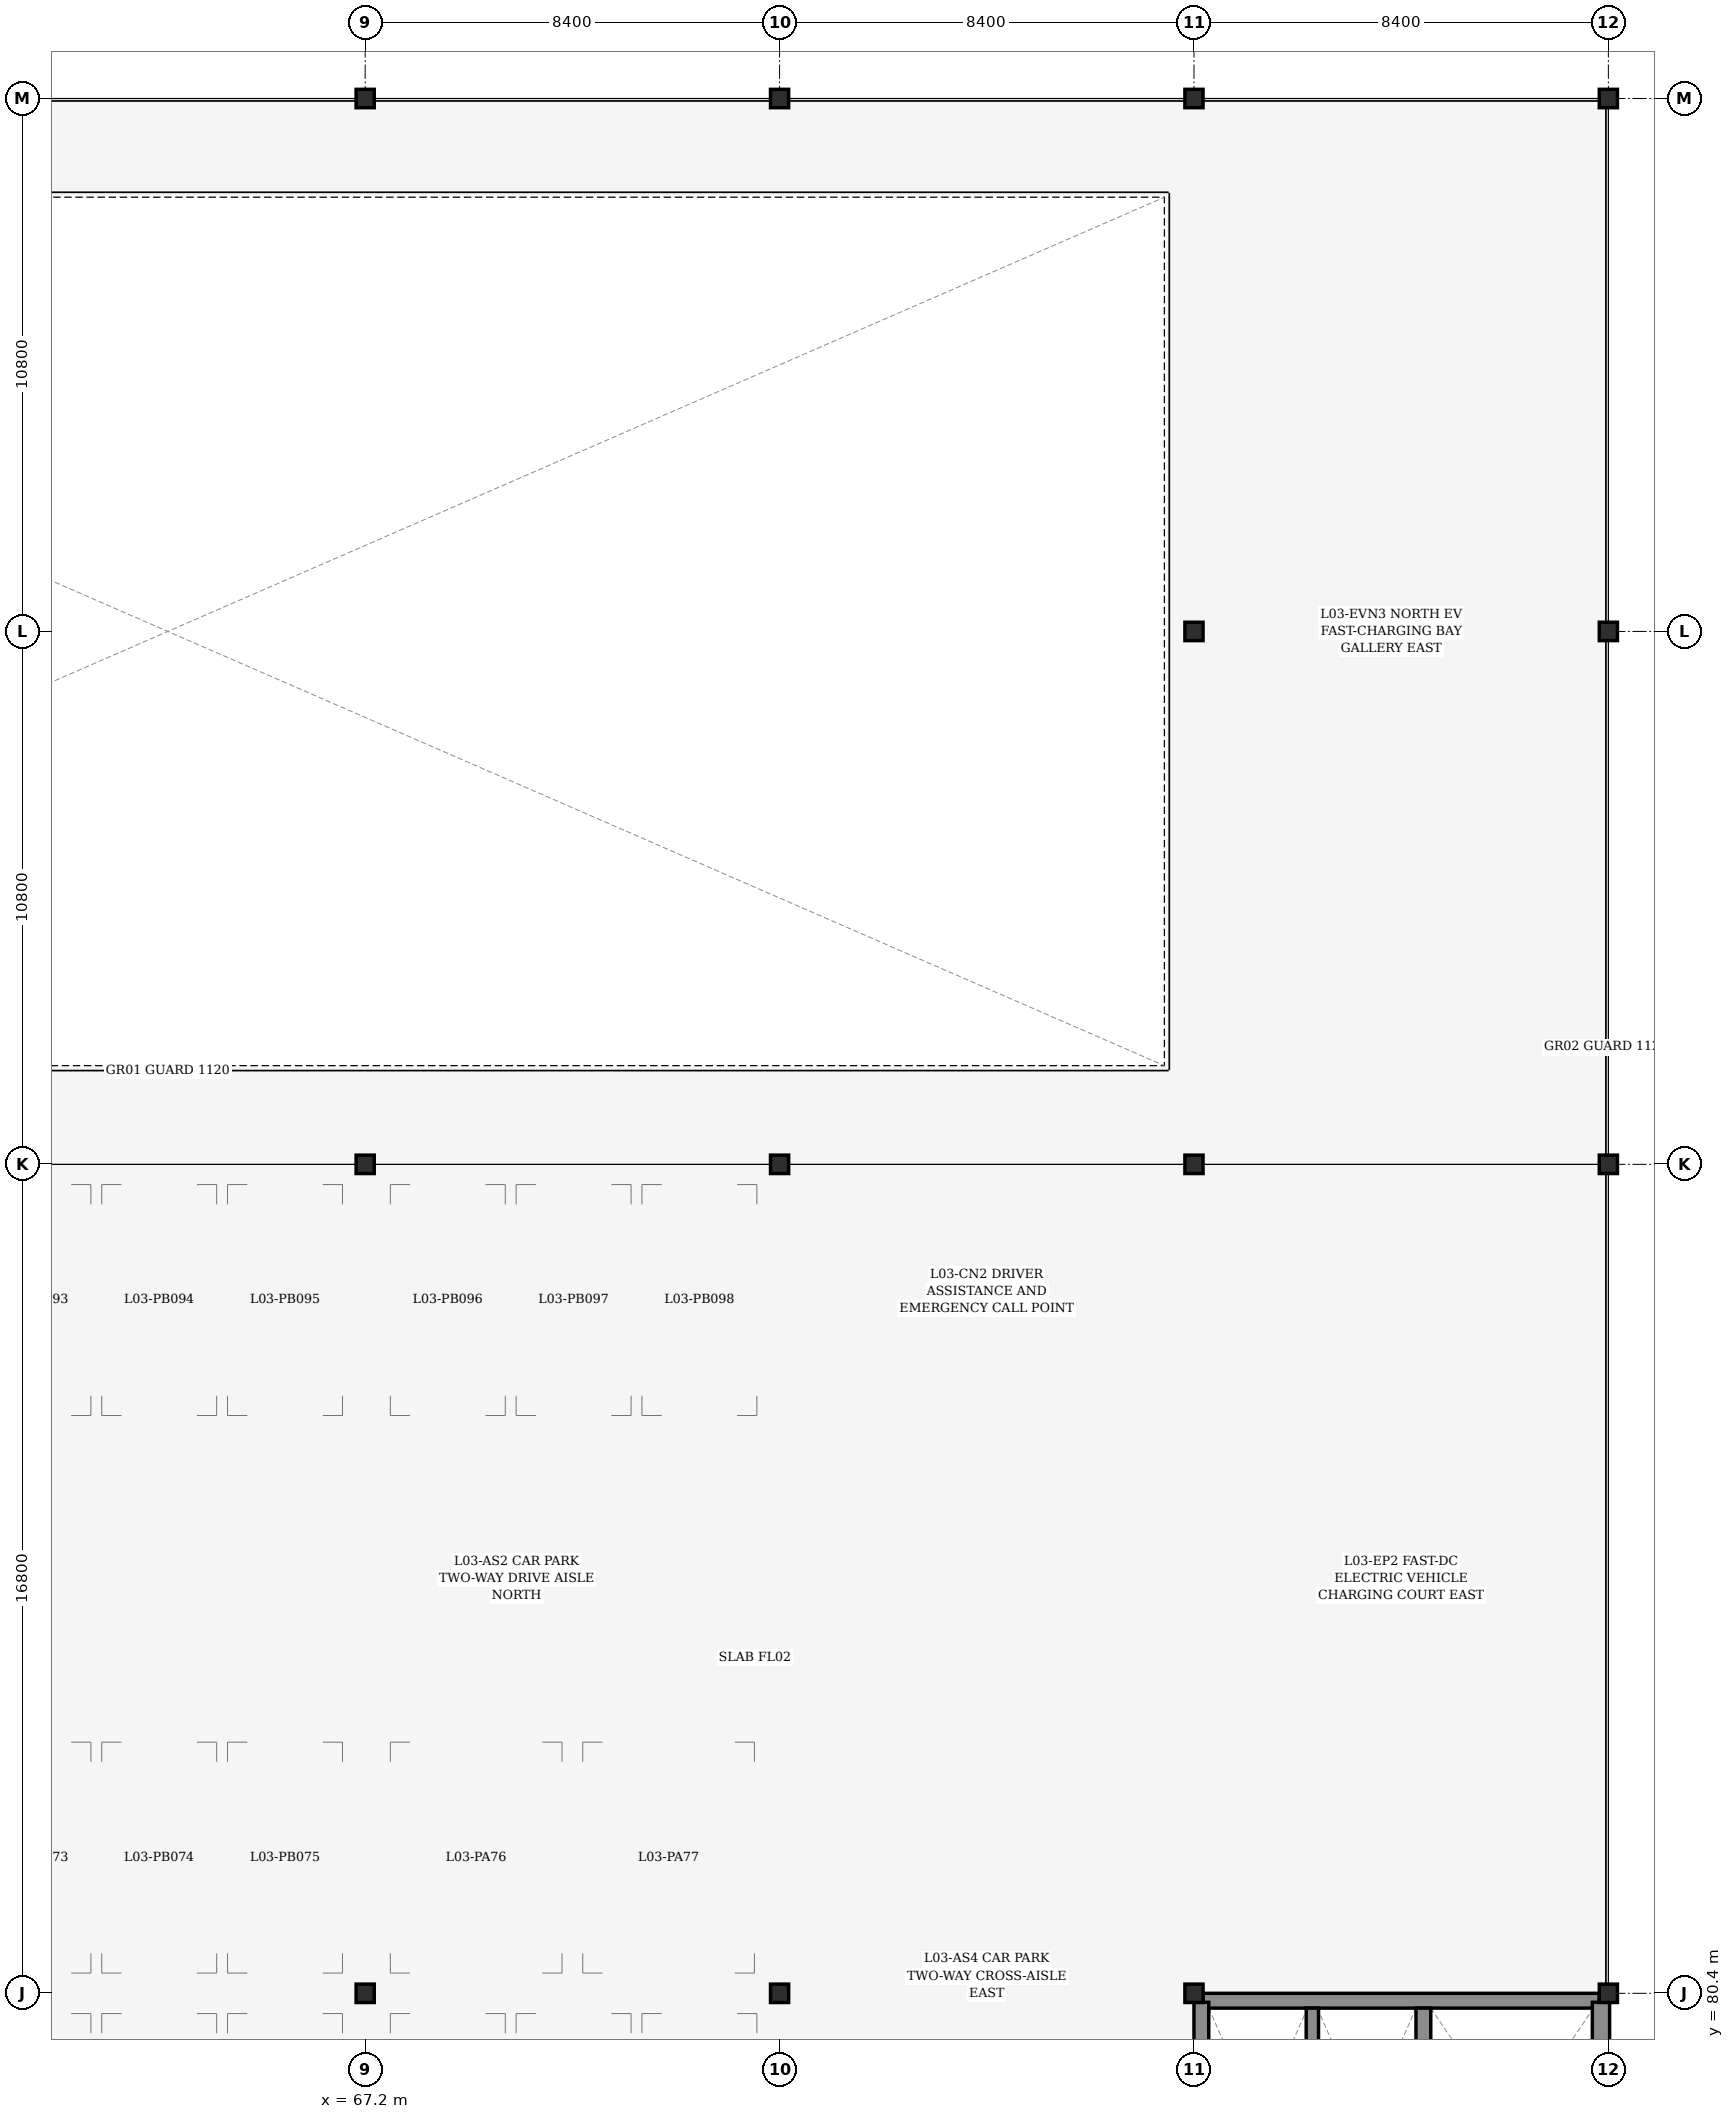
"""IFC4 building model, lengths in metres.
Left out: names, types, materials, properties, quantities, classifications, styles, units other than length and angle.
Written with IfcOpenShell. Run it as: python <this file> out.ifc"""

import sys

from ifc_helpers import new_model, si_unit, direction, frame, frame_2d, origin, origin_2d, place, context, subcontext, project, spatial, rectangle, i_section, extrude, element, save


model = new_model("IFC4")
c1 = context("Model", 3, precision=1e-05, world=origin(), true_north=direction((0.0, 1.0)))
c2 = subcontext(c1, "Body", "Model", "MODEL_VIEW")
j1 = project(units=[si_unit("LENGTHUNIT", "METRE"), si_unit("PLANEANGLEUNIT", "RADIAN")], contexts=[c1])
p1 = place(None, origin())
s1 = spatial("IfcSite", under=j1, at=p1, CompositionType="ELEMENT")
p2 = place(p1, origin())
s2 = spatial("IfcBuilding", under=s1, at=p2, CompositionType="ELEMENT")
p3 = place(p2, frame((0.0, 0.0, 12.6)))
s3 = spatial("IfcBuildingStorey", under=s2, at=p3, CompositionType="ELEMENT", Elevation=12.6)
for number, where, z_axis, x_axis in (
    (1, (67.2, 80.4, 0.0), (0.0, 0.0, 1.0), (1.0, 0.0, 0.0)),
    (2, (67.2, 97.2, 0.0), (0.0, 0.0, 1.0), (1.0, 0.0, 0.0)),
    (3, (67.2, 118.8, 0.0), (0.0, 0.0, 1.0), (1.0, 0.0, 0.0)),
    (4, (75.6, 80.4, 0.0), (0.0, 0.0, 1.0), (1.0, 0.0, 0.0)),
    (5, (75.6, 97.2, 0.0), (0.0, 0.0, 1.0), (1.0, 0.0, 0.0)),
    (6, (75.6, 118.8, 0.0), (0.0, 0.0, 1.0), (1.0, 0.0, 0.0)),
    (7, (84.0, 80.4, 0.0), (0.0, 0.0, 1.0), (1.0, 0.0, 0.0)),
    (8, (84.0, 97.2, 0.0), (0.0, 0.0, 1.0), (1.0, 0.0, 0.0)),
    (9, (84.0, 108.0, 0.0), (0.0, 0.0, 1.0), (1.0, 0.0, 0.0)),
    (10, (84.0, 118.8, 0.0), (0.0, 0.0, 1.0), (1.0, 0.0, 0.0)),
    (11, (92.4, 80.4, 0.0), (0.0, 0.0, 1.0), (1.0, 0.0, 0.0)),
    (12, (92.4, 97.2, 0.0), (0.0, 0.0, 1.0), (1.0, 0.0, 0.0)),
    (13, (92.4, 108.0, 0.0), (0.0, 0.0, 1.0), (1.0, 0.0, 0.0)),
    (14, (92.4, 118.8, 0.0), (0.0, 0.0, 1.0), (1.0, 0.0, 0.0)),
):
    element("IfcColumn", number, at=place(p3, frame(where, z_axis=z_axis, x_axis=x_axis)), inside=s3, PredefinedType="COLUMN", context=c2, shape_type="SweptSolid", body=[
        extrude(i_section(OverallWidth=0.373, OverallDepth=0.368, WebThickness=0.014, FlangeThickness=0.024, FilletRadius=0.015, at=origin_2d()), origin(), (0.0, 0.0, 1.0), 3.6),
    ])
p4 = place(p3, frame((84.185, 80.25, 0.0), z_axis=(0.0, 0.0, 1.0), x_axis=(1.0, 0.0, 0.0)))
e15 = element("IfcWall", 15, at=p4, inside=s3, PredefinedType="SHEAR", context=c2, shape_type="SweptSolid", body=[
    extrude(rectangle(XDim=8.031, YDim=0.3, at=frame_2d((4.016, 0.0))), origin(), (0.0, 0.0, 1.0), 3.38),
])
p5 = place(p3, frame((92.25, 63.782, 0.0), z_axis=(0.0, 0.0, 1.0), x_axis=(0.0, 1.0, 0.0)))
e16 = element("IfcWall", 16, at=p5, inside=s3, PredefinedType="SHEAR", context=c2, shape_type="SweptSolid", body=[
    extrude(rectangle(XDim=16.436, YDim=0.35, at=frame_2d((8.218, 0.0))), origin(), (0.0, 0.0, 1.0), 3.38),
])
p6 = place(p3, frame((84.15, 63.782, 0.0), z_axis=(0.0, 0.0, 1.0), x_axis=(0.0, 1.0, 0.0)))
e17 = element("IfcWall", 17, at=p6, inside=s3, PredefinedType="SHEAR", context=c2, shape_type="SweptSolid", body=[
    extrude(rectangle(XDim=16.436, YDim=0.3, at=frame_2d((8.218, 0.0))), origin(), (0.0, 0.0, 1.0), 3.38),
])
p7 = place(p6, frame((5.668, 0.0, 0.0)))
e18 = element("IfcOpeningElement", 18, at=p7, cuts=e17, PredefinedType="OPENING", context=c2, shape_type="SweptSolid", body=[
    extrude(rectangle(XDim=1.3, YDim=2.2, at=frame_2d((0.65, 1.1))), frame((0.0, 0.16, 0.0), z_axis=(0.0, -1.0, 0.0), x_axis=(1.0, 0.0, 0.0)), (0.0, 0.0, 1.0), 0.32),
])
p8 = place(p3, frame((88.65, 63.9, 0.0), z_axis=(0.0, 0.0, 1.0), x_axis=(0.0, 1.0, 0.0)))
e19 = element("IfcWall", 19, at=p8, inside=s3, PredefinedType="SHEAR", context=c2, shape_type="SweptSolid", body=[
    extrude(rectangle(XDim=16.2, YDim=0.3, at=frame_2d((8.1, 0.0))), origin(), (0.0, 0.0, 1.0), 3.38),
])
p9 = place(p8, frame((0.5, 0.0, 0.0)))
e20 = element("IfcOpeningElement", 20, at=p9, cuts=e19, PredefinedType="OPENING", context=c2, shape_type="SweptSolid", body=[
    extrude(rectangle(XDim=1.15, YDim=2.15, at=frame_2d((0.575, 1.075))), frame((0.0, 0.16, 0.0), z_axis=(0.0, -1.0, 0.0), x_axis=(1.0, 0.0, 0.0)), (0.0, 0.0, 1.0), 0.32),
])
p10 = place(p3, frame((86.4, 75.55, 0.0), z_axis=(0.0, 0.0, 1.0), x_axis=(0.0, 1.0, 0.0)))
e21 = element("IfcWall", 21, at=p10, inside=s3, PredefinedType="PARTITIONING", context=c2, shape_type="SweptSolid", body=[
    extrude(rectangle(XDim=4.55, YDim=0.25, at=frame_2d((2.275, 0.0))), origin(), (0.0, 0.0, 1.0), 2.525),
])
save(model, sys.argv[1])
